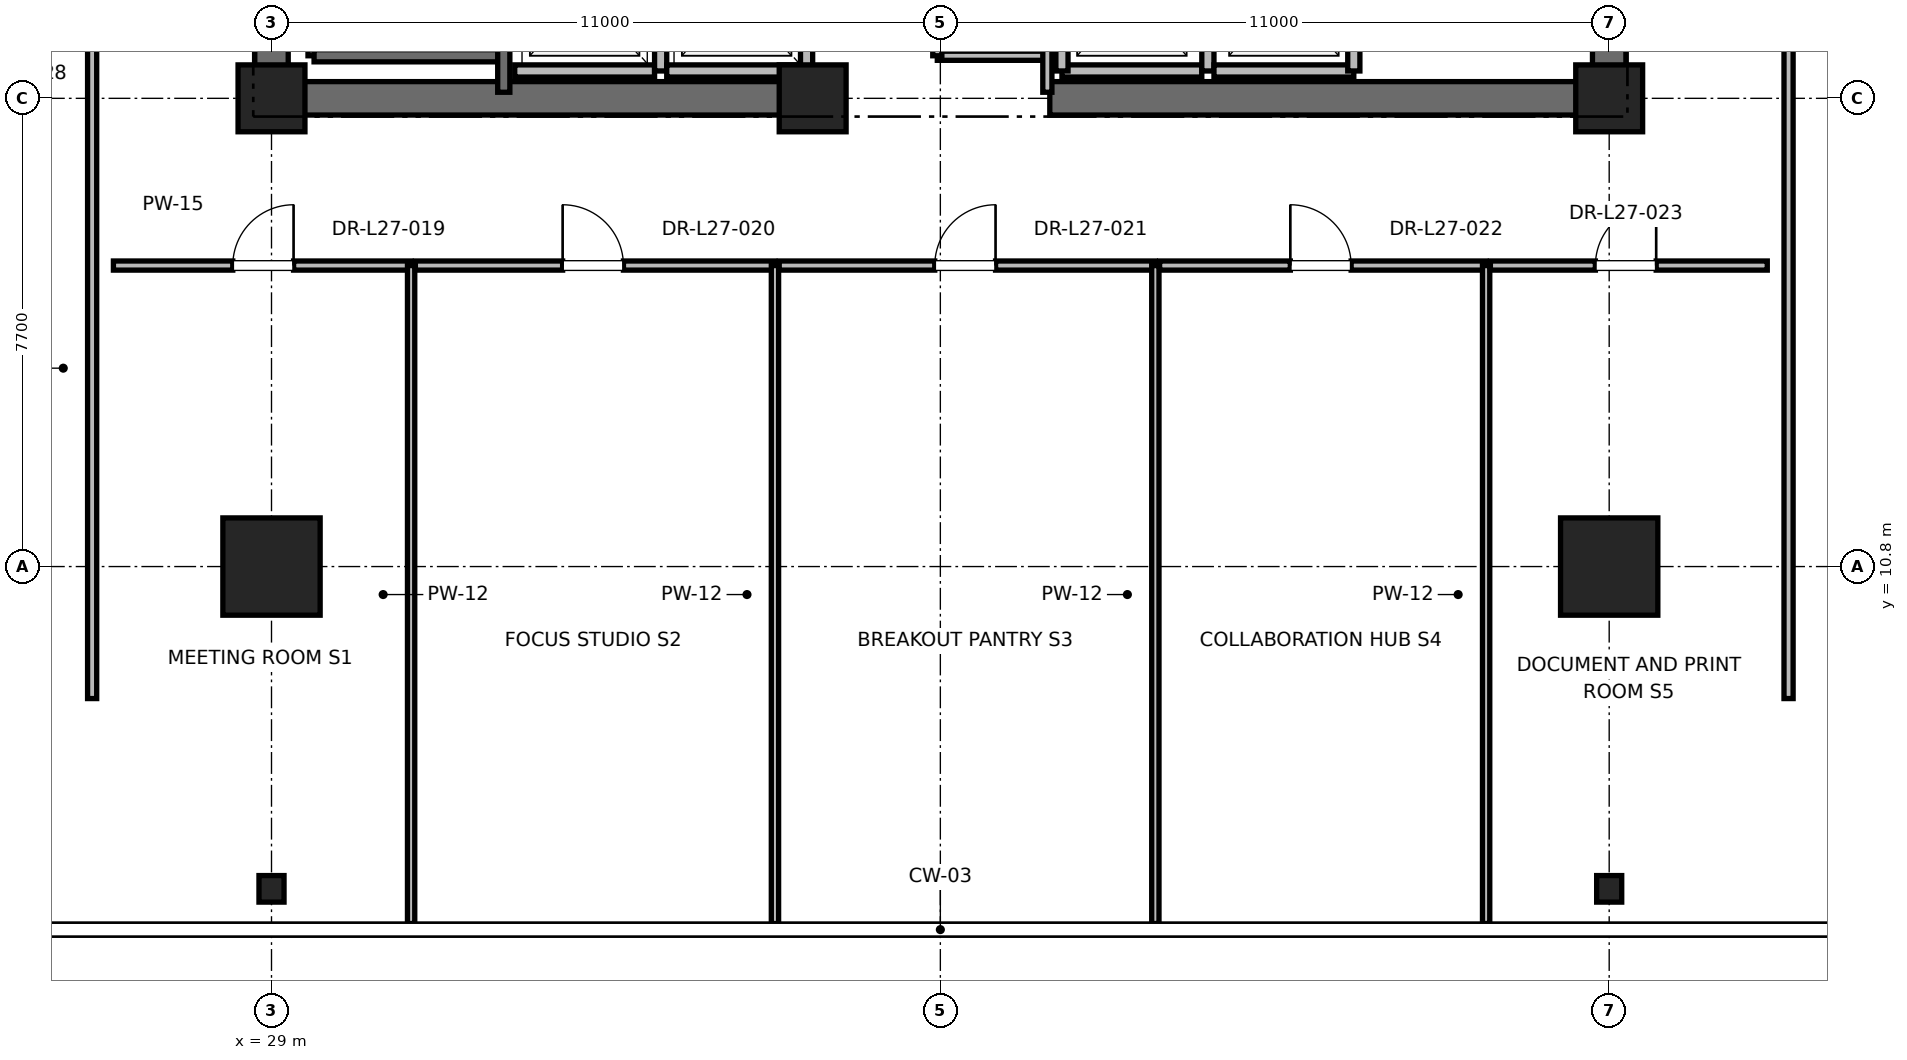
"""IFC4 building model, lengths in metres.
Left out: names, types, materials, properties, quantities, classifications, styles, units other than length and angle.
Written with IfcOpenShell. Run it as: python <this file> out.ifc"""

import sys

from ifc_helpers import new_model, si_unit, direction, frame, frame_2d, origin, origin_2d, place, context, subcontext, project, spatial, rectangle, i_section, extrude, element, fill, save


model = new_model("IFC4")
c1 = context("Model", 3, precision=1e-05, world=origin(), true_north=direction((0.0, 1.0)))
c2 = subcontext(c1, "Body", "Model", "MODEL_VIEW")
j1 = project(units=[si_unit("LENGTHUNIT", "METRE"), si_unit("PLANEANGLEUNIT", "RADIAN")], contexts=[c1])
p1 = place(None, origin())
s1 = spatial("IfcSite", under=j1, at=p1, CompositionType="ELEMENT")
p2 = place(p1, origin())
s2 = spatial("IfcBuilding", under=s1, at=p2, CompositionType="ELEMENT")
p3 = place(p2, frame((0.0, 0.0, 118.4)))
s3 = spatial("IfcBuildingStorey", under=s2, at=p3, CompositionType="ELEMENT", Elevation=118.4)
for number, where, z_axis, x_axis in (
    (1, (29.0, 10.8, 0.0), (0.0, 0.0, 1.0), (1.0, 0.0, 0.0)),
    (2, (51.0, 10.8, 0.0), (0.0, 0.0, 1.0), (1.0, 0.0, 0.0)),
):
    element("IfcColumn", number, at=place(p3, frame(where, z_axis=z_axis, x_axis=x_axis)), inside=s3, PredefinedType="COLUMN", context=c2, shape_type="SweptSolid", body=[
        extrude(rectangle(XDim=1.6, YDim=1.6, at=origin_2d()), origin(), (0.0, 0.0, 1.0), 5.0),
    ])
for number, where, z_axis, x_axis in (
    (3, (29.0, 5.5, 0.0), (0.0, 0.0, 1.0), (1.0, 0.0, 0.0)),
    (4, (51.0, 5.5, 0.0), (0.0, 0.0, 1.0), (1.0, 0.0, 0.0)),
):
    element("IfcColumn", number, at=place(p3, frame(where, z_axis=z_axis, x_axis=x_axis)), inside=s3, PredefinedType="COLUMN", context=c2, shape_type="SweptSolid", body=[
        extrude(i_section(OverallWidth=0.412, OverallDepth=0.437, WebThickness=0.036, FlangeThickness=0.058, FilletRadius=0.015, at=origin_2d()), origin(), (0.0, 0.0, 1.0), 5.0),
    ])
for number, where, z_axis, x_axis in (
    (5, (29.0, 18.5, 0.0), (0.0, 0.0, 1.0), (1.0, 0.0, 0.0)),
    (6, (51.0, 18.5, 0.0), (0.0, 0.0, 1.0), (1.0, 0.0, 0.0)),
    (7, (37.9, 18.5, 0.0), (0.0, 0.0, 1.0), (1.0, 0.0, 0.0)),
):
    element("IfcColumn", number, at=place(p3, frame(where, z_axis=z_axis, x_axis=x_axis)), inside=s3, PredefinedType="PILASTER", context=c2, shape_type="SweptSolid", body=[
        extrude(rectangle(XDim=1.1, YDim=1.1, at=origin_2d()), origin(), (0.0, 0.0, 1.0), 5.0),
    ])
for number, where, z_axis, x_axis in (
    (8, (29.0, 18.5, 0.0), (0.0, 0.0, 1.0), (1.0, 0.0, 0.0)),
    (9, (41.8, 18.5, 0.0), (0.0, 0.0, 1.0), (1.0, 0.0, 0.0)),
):
    element("IfcWall", number, at=place(p3, frame(where, z_axis=z_axis, x_axis=x_axis)), inside=s3, PredefinedType="SHEAR", context=c2, shape_type="SweptSolid", body=[
        extrude(rectangle(XDim=9.2, YDim=0.55, at=frame_2d((4.6, 0.0))), origin(), (0.0, 0.0, 1.0), 4.7),
    ])
p4 = place(p3, frame((29.0, 18.5, 0.0), z_axis=(0.0, 0.0, 1.0), x_axis=(0.0, 1.0, 0.0)))
e10 = element("IfcWall", 10, at=p4, inside=s3, PredefinedType="SHEAR", context=c2, shape_type="SweptSolid", body=[
    extrude(rectangle(XDim=8.8, YDim=0.55, at=frame_2d((4.4, 0.0))), origin(), (0.0, 0.0, 1.0), 4.7),
])
p5 = place(p3, frame((51.0, 18.5, 0.0), z_axis=(0.0, 0.0, 1.0), x_axis=(0.0, 1.0, 0.0)))
e11 = element("IfcWall", 11, at=p5, inside=s3, PredefinedType="SHEAR", context=c2, shape_type="SweptSolid", body=[
    extrude(rectangle(XDim=5.8, YDim=0.55, at=frame_2d((2.9, 0.0))), origin(), (0.0, 0.0, 1.0), 4.7),
])
p6 = place(p3, frame((29.7, 19.2, 0.0), z_axis=(0.0, 0.0, 1.0), x_axis=(0.0, 1.0, 0.0)))
e12 = element("IfcWall", 12, at=p6, inside=s3, PredefinedType="SOLIDWALL", context=c2, shape_type="SweptSolid", body=[
    extrude(rectangle(XDim=8.15, YDim=0.2, at=frame_2d((4.075, 0.0))), origin(), (0.0, 0.0, 1.0), 4.7),
])
p7 = place(p3, frame((29.7, 19.2, 0.0), z_axis=(0.0, 0.0, 1.0), x_axis=(1.0, 0.0, 0.0)))
e13 = element("IfcWall", 13, at=p7, inside=s3, PredefinedType="SOLIDWALL", context=c2, shape_type="SweptSolid", body=[
    extrude(rectangle(XDim=3.12, YDim=0.2, at=frame_2d((1.56, 0.0))), origin(), (0.0, 0.0, 1.0), 4.7),
])
p8 = place(p3, frame((32.82, 18.6, 0.0), z_axis=(0.0, 0.0, 1.0), x_axis=(0.0, 1.0, 0.0)))
e14 = element("IfcWall", 14, at=p8, inside=s3, PredefinedType="SOLIDWALL", context=c2, shape_type="SweptSolid", body=[
    extrude(rectangle(XDim=8.78, YDim=0.2, at=frame_2d((4.39, 0.0))), origin(), (0.0, 0.0, 1.0), 4.7),
])
p9 = place(p3, frame((33.0, 18.95, 0.0), z_axis=(0.0, 0.0, 1.0), x_axis=(1.0, 0.0, 0.0)))
e15 = element("IfcWall", 15, at=p9, inside=s3, PredefinedType="SOLIDWALL", context=c2, shape_type="SweptSolid", body=[
    extrude(rectangle(XDim=2.3, YDim=0.2, at=frame_2d((1.15, 0.0))), origin(), (0.0, 0.0, 1.0), 4.7),
])
p10 = place(p3, frame((35.4, 18.95, 0.0), z_axis=(0.0, 0.0, 1.0), x_axis=(0.0, 1.0, 0.0)))
e16 = element("IfcWall", 16, at=p10, inside=s3, PredefinedType="SOLIDWALL", context=c2, shape_type="SweptSolid", body=[
    extrude(rectangle(XDim=2.6, YDim=0.2, at=frame_2d((1.3, 0.0))), origin(), (0.0, 0.0, 1.0), 4.7),
])
p11 = place(p3, frame((35.5, 18.95, 0.0), z_axis=(0.0, 0.0, 1.0), x_axis=(1.0, 0.0, 0.0)))
e17 = element("IfcWall", 17, at=p11, inside=s3, PredefinedType="SOLIDWALL", context=c2, shape_type="SweptSolid", body=[
    extrude(rectangle(XDim=2.3, YDim=0.2, at=frame_2d((1.15, 0.0))), origin(), (0.0, 0.0, 1.0), 3.68),
])
p12 = place(p3, frame((37.8, 18.95, 0.0), z_axis=(0.0, 0.0, 1.0), x_axis=(0.0, 1.0, 0.0)))
e18 = element("IfcWall", 18, at=p12, inside=s3, PredefinedType="SOLIDWALL", context=c2, shape_type="SweptSolid", body=[
    extrude(rectangle(XDim=2.6, YDim=0.2, at=frame_2d((1.3, 0.0))), origin(), (0.0, 0.0, 1.0), 3.68),
])
p13 = place(p3, frame((42.0, 18.95, 0.0), z_axis=(0.0, 0.0, 1.0), x_axis=(1.0, 0.0, 0.0)))
e19 = element("IfcWall", 19, at=p13, inside=s3, PredefinedType="SOLIDWALL", context=c2, shape_type="SweptSolid", body=[
    extrude(rectangle(XDim=2.3, YDim=0.2, at=frame_2d((1.15, 0.0))), origin(), (0.0, 0.0, 1.0), 3.68),
])
p14 = place(p3, frame((42.0, 21.55, 0.0), z_axis=(0.0, 0.0, 1.0), x_axis=(0.0, -1.0, 0.0)))
e20 = element("IfcWall", 20, at=p14, inside=s3, PredefinedType="SOLIDWALL", context=c2, shape_type="SweptSolid", body=[
    extrude(rectangle(XDim=2.6, YDim=0.2, at=frame_2d((1.3, 0.0))), origin(), (0.0, 0.0, 1.0), 3.68),
])
p15 = place(p3, frame((44.4, 18.95, 0.0), z_axis=(0.0, 0.0, 1.0), x_axis=(0.0, 1.0, 0.0)))
e21 = element("IfcWall", 21, at=p15, inside=s3, PredefinedType="SOLIDWALL", context=c2, shape_type="SweptSolid", body=[
    extrude(rectangle(XDim=2.6, YDim=0.2, at=frame_2d((1.3, 0.0))), origin(), (0.0, 0.0, 1.0), 4.7),
])
p16 = place(p3, frame((44.5, 18.95, 0.0), z_axis=(0.0, 0.0, 1.0), x_axis=(1.0, 0.0, 0.0)))
e22 = element("IfcWall", 22, at=p16, inside=s3, PredefinedType="SOLIDWALL", context=c2, shape_type="SweptSolid", body=[
    extrude(rectangle(XDim=2.3, YDim=0.2, at=frame_2d((1.15, 0.0))), origin(), (0.0, 0.0, 1.0), 4.7),
])
p17 = place(p3, frame((46.8, 18.95, 0.0), z_axis=(0.0, 0.0, 1.0), x_axis=(0.0, 1.0, 0.0)))
e23 = element("IfcWall", 23, at=p17, inside=s3, PredefinedType="SOLIDWALL", context=c2, shape_type="SweptSolid", body=[
    extrude(rectangle(XDim=2.6, YDim=0.2, at=frame_2d((1.3, 0.0))), origin(), (0.0, 0.0, 1.0), 4.7),
])
p18 = place(p3, frame((39.95, 19.2, 0.0), z_axis=(0.0, 0.0, 1.0), x_axis=(1.0, 0.0, 0.0)))
e24 = element("IfcWall", 24, at=p18, inside=s3, PredefinedType="PARTITIONING", context=c2, shape_type="SweptSolid", body=[
    extrude(rectangle(XDim=1.81, YDim=0.15, at=frame_2d((0.905, 0.0))), origin(), (0.0, 0.0, 1.0), 2.85),
])
p19 = place(p3, frame((41.76, 18.6, 0.0), z_axis=(0.0, 0.0, 1.0), x_axis=(0.0, 1.0, 0.0)))
e25 = element("IfcWall", 25, at=p19, inside=s3, PredefinedType="PARTITIONING", context=c2, shape_type="SweptSolid", body=[
    extrude(rectangle(XDim=3.6, YDim=0.15, at=frame_2d((1.8, 0.0))), origin(), (0.0, 0.0, 1.0), 2.85),
])
p20 = place(p3, frame((39.95, 19.2, 0.0), z_axis=(0.0, 0.0, 1.0), x_axis=(0.0, 1.0, 0.0)))
e26 = element("IfcWall", 26, at=p20, inside=s3, PredefinedType="PARTITIONING", context=c2, shape_type="SweptSolid", body=[
    extrude(rectangle(XDim=3.0, YDim=0.15, at=frame_2d((1.5, 0.0))), origin(), (0.0, 0.0, 1.0), 2.85),
])
p21 = place(p20, frame((1.05, 0.0, 0.0)))
e27 = element("IfcOpeningElement", 27, at=p21, cuts=e26, PredefinedType="OPENING", context=c2, shape_type="SweptSolid", body=[
    extrude(rectangle(XDim=0.9, YDim=2.1, at=frame_2d((0.45, 1.05))), frame((0.0, 0.075, 0.0), z_axis=(0.0, -1.0, 0.0), x_axis=(1.0, 0.0, 0.0)), (0.0, 0.0, 1.0), 0.15),
])
p22 = place(p3, frame((26.4, 15.75, 0.0), z_axis=(0.0, 0.0, 1.0), x_axis=(1.0, 0.0, 0.0)))
e28 = element("IfcWall", 28, at=p22, inside=s3, PredefinedType="PARTITIONING", context=c2, shape_type="SweptSolid", body=[
    extrude(rectangle(XDim=4.896, YDim=0.15, at=frame_2d((2.448, 0.0))), origin(), (0.0, 0.0, 1.0), 2.85),
])
p23 = place(p22, frame((1.963, 0.0, 0.0)))
e29 = element("IfcOpeningElement", 29, at=p23, cuts=e28, PredefinedType="OPENING", context=c2, shape_type="SweptSolid", body=[
    extrude(rectangle(XDim=1.0, YDim=2.15, at=frame_2d((0.5, 1.075))), frame((0.0, 0.075, 0.0), z_axis=(0.0, -1.0, 0.0), x_axis=(1.0, 0.0, 0.0)), (0.0, 0.0, 1.0), 0.15),
])
p24 = place(p3, frame((31.296, 4.929, 0.0), z_axis=(0.0, 0.0, 1.0), x_axis=(0.0, 1.0, 0.0)))
e30 = element("IfcWall", 30, at=p24, inside=s3, PredefinedType="PARTITIONING", context=c2, shape_type="SweptSolid", body=[
    extrude(rectangle(XDim=10.821, YDim=0.12, at=frame_2d((5.41, 0.0))), origin(), (0.0, 0.0, 1.0), 2.85),
])
p25 = place(p3, frame((31.366, 15.75, 0.0), z_axis=(0.0, 0.0, 1.0), x_axis=(1.0, 0.0, 0.0)))
e31 = element("IfcWall", 31, at=p25, inside=s3, PredefinedType="PARTITIONING", context=c2, shape_type="SweptSolid", body=[
    extrude(rectangle(XDim=5.914, YDim=0.15, at=frame_2d((2.957, 0.0))), origin(), (0.0, 0.0, 1.0), 2.85),
])
p26 = place(p25, frame((2.422, 0.0, 0.0)))
e32 = element("IfcOpeningElement", 32, at=p26, cuts=e31, PredefinedType="OPENING", context=c2, shape_type="SweptSolid", body=[
    extrude(rectangle(XDim=1.0, YDim=2.15, at=frame_2d((0.5, 1.075))), frame((0.0, 0.075, 0.0), z_axis=(0.0, -1.0, 0.0), x_axis=(1.0, 0.0, 0.0)), (0.0, 0.0, 1.0), 0.15),
])
p27 = place(p3, frame((37.28, 4.929, 0.0), z_axis=(0.0, 0.0, 1.0), x_axis=(0.0, 1.0, 0.0)))
e33 = element("IfcWall", 33, at=p27, inside=s3, PredefinedType="PARTITIONING", context=c2, shape_type="SweptSolid", body=[
    extrude(rectangle(XDim=10.821, YDim=0.12, at=frame_2d((5.41, 0.0))), origin(), (0.0, 0.0, 1.0), 2.85),
])
p28 = place(p3, frame((37.35, 15.75, 0.0), z_axis=(0.0, 0.0, 1.0), x_axis=(1.0, 0.0, 0.0)))
e34 = element("IfcWall", 34, at=p28, inside=s3, PredefinedType="PARTITIONING", context=c2, shape_type="SweptSolid", body=[
    extrude(rectangle(XDim=6.186, YDim=0.15, at=frame_2d((3.093, 0.0))), origin(), (0.0, 0.0, 1.0), 2.85),
])
p29 = place(p28, frame((2.558, 0.0, 0.0)))
e35 = element("IfcOpeningElement", 35, at=p29, cuts=e34, PredefinedType="OPENING", context=c2, shape_type="SweptSolid", body=[
    extrude(rectangle(XDim=1.0, YDim=2.15, at=frame_2d((0.5, 1.075))), frame((0.0, 0.075, 0.0), z_axis=(0.0, -1.0, 0.0), x_axis=(1.0, 0.0, 0.0)), (0.0, 0.0, 1.0), 0.15),
])
p30 = place(p3, frame((43.536, 4.929, 0.0), z_axis=(0.0, 0.0, 1.0), x_axis=(0.0, 1.0, 0.0)))
e36 = element("IfcWall", 36, at=p30, inside=s3, PredefinedType="PARTITIONING", context=c2, shape_type="SweptSolid", body=[
    extrude(rectangle(XDim=10.821, YDim=0.12, at=frame_2d((5.41, 0.0))), origin(), (0.0, 0.0, 1.0), 2.85),
])
p31 = place(p3, frame((43.606, 15.75, 0.0), z_axis=(0.0, 0.0, 1.0), x_axis=(1.0, 0.0, 0.0)))
e37 = element("IfcWall", 37, at=p31, inside=s3, PredefinedType="PARTITIONING", context=c2, shape_type="SweptSolid", body=[
    extrude(rectangle(XDim=5.37, YDim=0.15, at=frame_2d((2.685, 0.0))), origin(), (0.0, 0.0, 1.0), 2.85),
])
p32 = place(p31, frame((2.15, 0.0, 0.0)))
e38 = element("IfcOpeningElement", 38, at=p32, cuts=e37, PredefinedType="OPENING", context=c2, shape_type="SweptSolid", body=[
    extrude(rectangle(XDim=1.0, YDim=2.15, at=frame_2d((0.5, 1.075))), frame((0.0, 0.075, 0.0), z_axis=(0.0, -1.0, 0.0), x_axis=(1.0, 0.0, 0.0)), (0.0, 0.0, 1.0), 0.15),
])
p33 = place(p3, frame((48.976, 4.929, 0.0), z_axis=(0.0, 0.0, 1.0), x_axis=(0.0, 1.0, 0.0)))
e39 = element("IfcWall", 39, at=p33, inside=s3, PredefinedType="PARTITIONING", context=c2, shape_type="SweptSolid", body=[
    extrude(rectangle(XDim=10.821, YDim=0.12, at=frame_2d((5.41, 0.0))), origin(), (0.0, 0.0, 1.0), 2.85),
])
p34 = place(p3, frame((49.046, 15.75, 0.0), z_axis=(0.0, 0.0, 1.0), x_axis=(1.0, 0.0, 0.0)))
e40 = element("IfcWall", 40, at=p34, inside=s3, PredefinedType="PARTITIONING", context=c2, shape_type="SweptSolid", body=[
    extrude(rectangle(XDim=4.554, YDim=0.15, at=frame_2d((2.277, 0.0))), origin(), (0.0, 0.0, 1.0), 2.85),
])
p35 = place(p34, frame((1.727, 0.0, 0.0)))
e41 = element("IfcOpeningElement", 41, at=p35, cuts=e40, PredefinedType="OPENING", context=c2, shape_type="SweptSolid", body=[
    extrude(rectangle(XDim=1.0, YDim=2.15, at=frame_2d((0.5, 1.075))), frame((0.0, 0.075, 0.0), z_axis=(0.0, -1.0, 0.0), x_axis=(1.0, 0.0, 0.0)), (0.0, 0.0, 1.0), 0.15),
])
p36 = place(p3, frame((26.05, 8.629, 0.0), z_axis=(0.0, 0.0, 1.0), x_axis=(0.0, 1.0, 0.0)))
e42 = element("IfcWall", 42, at=p36, inside=s3, PredefinedType="PARTITIONING", context=c2, shape_type="SweptSolid", body=[
    extrude(rectangle(XDim=12.832, YDim=0.15, at=frame_2d((6.416, 0.0))), origin(), (0.0, 0.0, 1.0), 2.85),
])
p37 = place(p36, frame((10.867, 0.0, 0.0)))
e43 = element("IfcOpeningElement", 43, at=p37, cuts=e42, PredefinedType="OPENING", context=c2, shape_type="SweptSolid", body=[
    extrude(rectangle(XDim=1.0, YDim=2.15, at=frame_2d((0.5, 1.075))), frame((0.0, 0.075, 0.0), z_axis=(0.0, -1.0, 0.0), x_axis=(1.0, 0.0, 0.0)), (0.0, 0.0, 1.0), 0.15),
])
p38 = place(p3, frame((53.95, 8.629, 0.0), z_axis=(0.0, 0.0, 1.0), x_axis=(0.0, 1.0, 0.0)))
e44 = element("IfcWall", 44, at=p38, inside=s3, PredefinedType="PARTITIONING", context=c2, shape_type="SweptSolid", body=[
    extrude(rectangle(XDim=15.852, YDim=0.15, at=frame_2d((7.926, 0.0))), origin(), (0.0, 0.0, 1.0), 2.85),
])
p39 = place(p38, frame((12.376, 0.0, 0.0)))
e45 = element("IfcOpeningElement", 45, at=p39, cuts=e44, PredefinedType="OPENING", context=c2, shape_type="SweptSolid", body=[
    extrude(rectangle(XDim=1.0, YDim=2.15, at=frame_2d((0.5, 1.075))), frame((0.0, 0.075, 0.0), z_axis=(0.0, -1.0, 0.0), x_axis=(1.0, 0.0, 0.0)), (0.0, 0.0, 1.0), 0.15),
])
p40 = place(p23, origin())
e46 = element("IfcDoor", 46, at=p40, inside=s3, OperationType="SINGLE_SWING_RIGHT", PredefinedType="DOOR", context=c2, shape_type="SweptSolid", body=[
    extrude(rectangle(XDim=1.0, YDim=2.15, at=frame_2d((0.5, 1.075))), frame((0.0, 0.025, 0.0), z_axis=(0.0, -1.0, 0.0), x_axis=(1.0, 0.0, 0.0)), (0.0, 0.0, 1.0), 0.05),
])
fill(e29, e46)
p41 = place(p26, origin())
e47 = element("IfcDoor", 47, at=p41, inside=s3, OperationType="SINGLE_SWING_LEFT", PredefinedType="DOOR", context=c2, shape_type="SweptSolid", body=[
    extrude(rectangle(XDim=1.0, YDim=2.15, at=frame_2d((0.5, 1.075))), frame((0.0, 0.025, 0.0), z_axis=(0.0, -1.0, 0.0), x_axis=(1.0, 0.0, 0.0)), (0.0, 0.0, 1.0), 0.05),
])
fill(e32, e47)
p42 = place(p29, origin())
e48 = element("IfcDoor", 48, at=p42, inside=s3, OperationType="SINGLE_SWING_RIGHT", PredefinedType="DOOR", context=c2, shape_type="SweptSolid", body=[
    extrude(rectangle(XDim=1.0, YDim=2.15, at=frame_2d((0.5, 1.075))), frame((0.0, 0.025, 0.0), z_axis=(0.0, -1.0, 0.0), x_axis=(1.0, 0.0, 0.0)), (0.0, 0.0, 1.0), 0.05),
])
fill(e35, e48)
p43 = place(p32, origin())
e49 = element("IfcDoor", 49, at=p43, inside=s3, OperationType="SINGLE_SWING_LEFT", PredefinedType="DOOR", context=c2, shape_type="SweptSolid", body=[
    extrude(rectangle(XDim=1.0, YDim=2.15, at=frame_2d((0.5, 1.075))), frame((0.0, 0.025, 0.0), z_axis=(0.0, -1.0, 0.0), x_axis=(1.0, 0.0, 0.0)), (0.0, 0.0, 1.0), 0.05),
])
fill(e38, e49)
p44 = place(p35, origin())
e50 = element("IfcDoor", 50, at=p44, inside=s3, OperationType="SINGLE_SWING_RIGHT", PredefinedType="DOOR", context=c2, shape_type="SweptSolid", body=[
    extrude(rectangle(XDim=1.0, YDim=2.15, at=frame_2d((0.5, 1.075))), frame((0.0, 0.025, 0.0), z_axis=(0.0, -1.0, 0.0), x_axis=(1.0, 0.0, 0.0)), (0.0, 0.0, 1.0), 0.05),
])
fill(e41, e50)
save(model, sys.argv[1])
